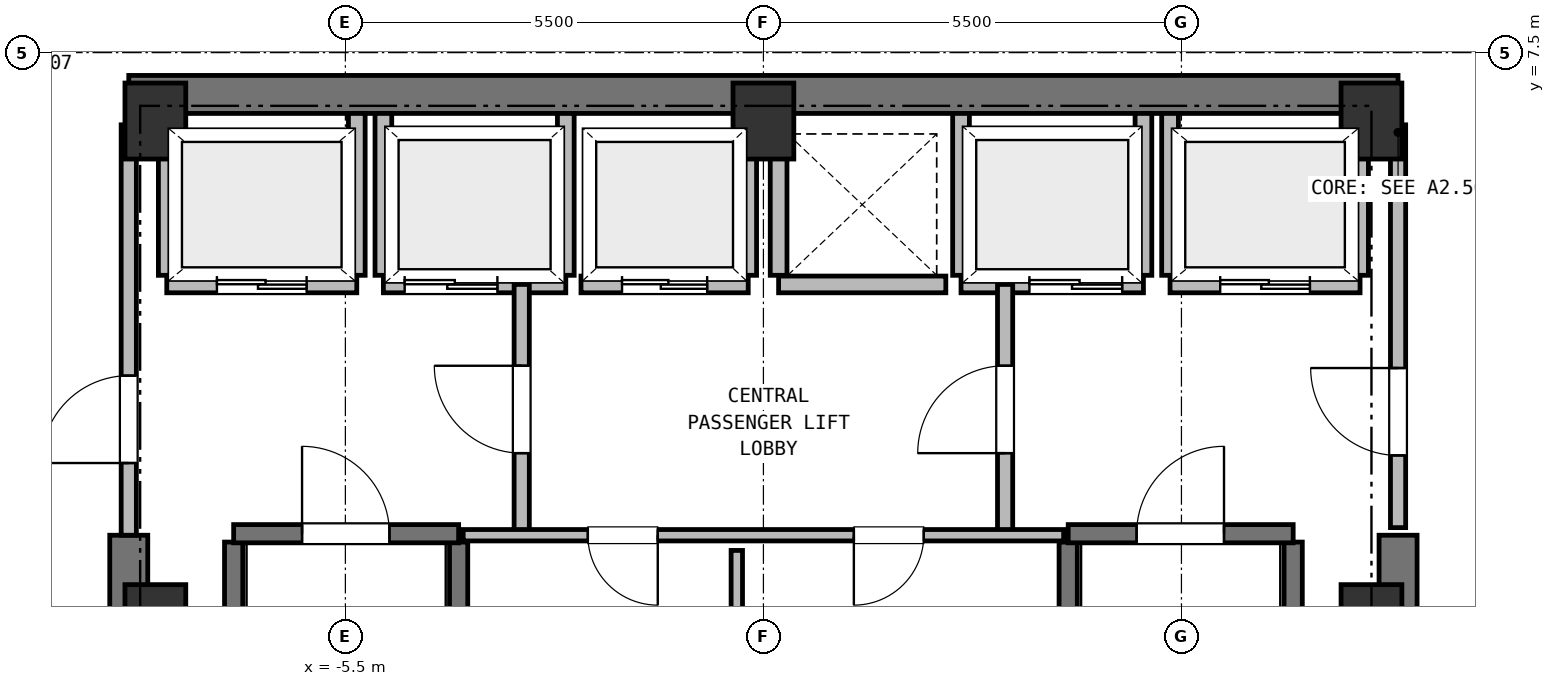
"""IFC4 building model, lengths in metres.
Left out: names, types, materials, properties, quantities, classifications, styles, units other than length and angle.
Written with IfcOpenShell. Run it as: python <this file> out.ifc"""

import sys

from ifc_helpers import new_model, si_unit, direction, frame, frame_2d, origin, origin_2d, place, context, subcontext, project, spatial, rectangle, extrude, element, fill, save


model = new_model("IFC4")
c1 = context("Model", 3, precision=1e-05, world=origin(), true_north=direction((0.0, 1.0)))
c2 = subcontext(c1, "Body", "Model", "MODEL_VIEW")
j1 = project(units=[si_unit("LENGTHUNIT", "METRE"), si_unit("PLANEANGLEUNIT", "RADIAN")], contexts=[c1])
p1 = place(None, origin())
s1 = spatial("IfcSite", under=j1, at=p1, CompositionType="ELEMENT")
p2 = place(p1, origin())
s2 = spatial("IfcBuilding", under=s1, at=p2, CompositionType="ELEMENT")
p3 = place(p2, frame((0.0, 0.0, 186.55)))
s3 = spatial("IfcBuildingStorey", under=s2, at=p3, CompositionType="ELEMENT", Elevation=186.55)
for number, where, z_axis, x_axis in (
    (1, (8.0, 0.0, 0.0), (0.0, 0.0, 1.0), (1.0, 0.0, 0.0)),
    (2, (8.0, 6.6, 0.0), (0.0, 0.0, 1.0), (1.0, 0.0, 0.0)),
    (3, (0.0, 6.6, 0.0), (0.0, 0.0, 1.0), (1.0, 0.0, 0.0)),
    (4, (-8.0, 6.6, 0.0), (0.0, 0.0, 1.0), (1.0, 0.0, 0.0)),
    (5, (-8.0, 0.0, 0.0), (0.0, 0.0, 1.0), (1.0, 0.0, 0.0)),
):
    element("IfcColumn", number, at=place(p3, frame(where, z_axis=z_axis, x_axis=x_axis)), inside=s3, PredefinedType="COLUMN", context=c2, shape_type="SweptSolid", body=[
        extrude(rectangle(XDim=0.8, YDim=1.0, at=origin_2d()), origin(), (0.0, 0.0, 1.0), 3.8),
    ])
p4 = place(p3, frame((-8.35, 6.95, 0.0), z_axis=(0.0, 0.0, 1.0), x_axis=(1.0, 0.0, 0.0)))
e6 = element("IfcWall", 6, at=p4, inside=s3, PredefinedType="SHEAR", context=c2, shape_type="SweptSolid", body=[
    extrude(rectangle(XDim=16.7, YDim=0.5, at=frame_2d((8.35, 0.0))), origin(), (0.0, 0.0, 1.0), 3.55),
])
for number, where, z_axis, x_axis in (
    (7, (-8.35, -6.95, 0.0), (0.0, 0.0, 1.0), (0.0, 1.0, 0.0)),
    (8, (8.35, -6.95, 0.0), (0.0, 0.0, 1.0), (0.0, 1.0, 0.0)),
):
    element("IfcWall", number, at=place(p3, frame(where, z_axis=z_axis, x_axis=x_axis)), inside=s3, PredefinedType="SHEAR", context=c2, shape_type="SweptSolid", body=[
        extrude(rectangle(XDim=8.1, YDim=0.5, at=frame_2d((4.05, 0.0))), origin(), (0.0, 0.0, 1.0), 3.55),
    ])
for number, where, z_axis, x_axis in (
    (9, (-6.97, -6.16, 0.0), (0.0, 0.0, 1.0), (0.0, 1.0, 0.0)),
    (10, (-4.01, -6.16, 0.0), (0.0, 0.0, 1.0), (0.0, 1.0, 0.0)),
):
    element("IfcWall", number, at=place(p3, frame(where, z_axis=z_axis, x_axis=x_axis)), inside=s3, PredefinedType="SHEAR", context=c2, shape_type="SweptSolid", body=[
        extrude(rectangle(XDim=7.22, YDim=0.24, at=frame_2d((3.61, 0.0))), origin(), (0.0, 0.0, 1.0), 3.55),
    ])
p5 = place(p3, frame((-6.97, 1.17, 0.0), z_axis=(0.0, 0.0, 1.0), x_axis=(1.0, 0.0, 0.0)))
e11 = element("IfcWall", 11, at=p5, inside=s3, PredefinedType="SHEAR", context=c2, shape_type="SweptSolid", body=[
    extrude(rectangle(XDim=2.96, YDim=0.24, at=frame_2d((1.48, 0.0))), origin(), (0.0, 0.0, 1.0), 3.55),
])
p6 = place(p5, frame((0.9, 0.0, 0.0)))
e12 = element("IfcOpeningElement", 12, at=p6, cuts=e11, PredefinedType="OPENING", context=c2, shape_type="SweptSolid", body=[
    extrude(rectangle(XDim=1.15, YDim=2.15, at=frame_2d((0.575, 1.075))), frame((0.0, 0.13, 0.0), z_axis=(0.0, -1.0, 0.0), x_axis=(1.0, 0.0, 0.0)), (0.0, 0.0, 1.0), 0.26),
])
for number, where, z_axis, x_axis in (
    (13, (4.01, -6.16, 0.0), (0.0, 0.0, 1.0), (0.0, 1.0, 0.0)),
    (14, (6.97, -6.16, 0.0), (0.0, 0.0, 1.0), (0.0, 1.0, 0.0)),
):
    element("IfcWall", number, at=place(p3, frame(where, z_axis=z_axis, x_axis=x_axis)), inside=s3, PredefinedType="SHEAR", context=c2, shape_type="SweptSolid", body=[
        extrude(rectangle(XDim=7.22, YDim=0.24, at=frame_2d((3.61, 0.0))), origin(), (0.0, 0.0, 1.0), 3.55),
    ])
p7 = place(p3, frame((4.01, 1.17, 0.0), z_axis=(0.0, 0.0, 1.0), x_axis=(1.0, 0.0, 0.0)))
e15 = element("IfcWall", 15, at=p7, inside=s3, PredefinedType="SHEAR", context=c2, shape_type="SweptSolid", body=[
    extrude(rectangle(XDim=2.96, YDim=0.24, at=frame_2d((1.48, 0.0))), origin(), (0.0, 0.0, 1.0), 3.55),
])
p8 = place(p7, frame((0.9, 0.0, 0.0)))
e16 = element("IfcOpeningElement", 16, at=p8, cuts=e15, PredefinedType="OPENING", context=c2, shape_type="SweptSolid", body=[
    extrude(rectangle(XDim=1.15, YDim=2.15, at=frame_2d((0.575, 1.075))), frame((0.0, 0.13, 0.0), z_axis=(0.0, -1.0, 0.0), x_axis=(1.0, 0.0, 0.0)), (0.0, 0.0, 1.0), 0.26),
])
p9 = place(p3, frame((-7.85, 4.45, 0.0), z_axis=(0.0, 0.0, 1.0), x_axis=(1.0, 0.0, 0.0)))
e17 = element("IfcWall", 17, at=p9, inside=s3, PredefinedType="PARTITIONING", context=c2, shape_type="SweptSolid", body=[
    extrude(rectangle(XDim=2.5, YDim=0.22, at=frame_2d((1.25, 0.0))), origin(), (0.0, 0.0, 1.0), 3.55),
])
p10 = place(p9, frame((0.66, 0.0, 0.0)))
e18 = element("IfcOpeningElement", 18, at=p10, cuts=e17, PredefinedType="OPENING", context=c2, shape_type="SweptSolid", body=[
    extrude(rectangle(XDim=1.18, YDim=2.15, at=frame_2d((0.59, 1.075))), frame((0.0, 0.12, 0.0), z_axis=(0.0, -1.0, 0.0), x_axis=(1.0, 0.0, 0.0)), (0.0, 0.0, 1.0), 0.24),
])
p11 = place(p3, frame((-7.85, 4.57, 0.0), z_axis=(0.0, 0.0, 1.0), x_axis=(0.0, 1.0, 0.0)))
e19 = element("IfcWall", 19, at=p11, inside=s3, PredefinedType="PARTITIONING", context=c2, shape_type="SweptSolid", body=[
    extrude(rectangle(XDim=2.13, YDim=0.22, at=frame_2d((1.065, 0.0))), origin(), (0.0, 0.0, 1.0), 3.18),
])
p12 = place(p3, frame((-5.35, 4.57, 0.0), z_axis=(0.0, 0.0, 1.0), x_axis=(0.0, 1.0, 0.0)))
e20 = element("IfcWall", 20, at=p12, inside=s3, PredefinedType="PARTITIONING", context=c2, shape_type="SweptSolid", body=[
    extrude(rectangle(XDim=2.13, YDim=0.22, at=frame_2d((1.065, 0.0))), origin(), (0.0, 0.0, 1.0), 3.55),
])
p13 = place(p3, frame((5.35, 4.45, 0.0), z_axis=(0.0, 0.0, 1.0), x_axis=(1.0, 0.0, 0.0)))
e21 = element("IfcWall", 21, at=p13, inside=s3, PredefinedType="PARTITIONING", context=c2, shape_type="SweptSolid", body=[
    extrude(rectangle(XDim=2.5, YDim=0.22, at=frame_2d((1.25, 0.0))), origin(), (0.0, 0.0, 1.0), 3.55),
])
p14 = place(p13, frame((0.66, 0.0, 0.0)))
e22 = element("IfcOpeningElement", 22, at=p14, cuts=e21, PredefinedType="OPENING", context=c2, shape_type="SweptSolid", body=[
    extrude(rectangle(XDim=1.18, YDim=2.15, at=frame_2d((0.59, 1.075))), frame((0.0, 0.12, 0.0), z_axis=(0.0, -1.0, 0.0), x_axis=(1.0, 0.0, 0.0)), (0.0, 0.0, 1.0), 0.24),
])
p15 = place(p3, frame((5.35, 4.57, 0.0), z_axis=(0.0, 0.0, 1.0), x_axis=(0.0, 1.0, 0.0)))
e23 = element("IfcWall", 23, at=p15, inside=s3, PredefinedType="PARTITIONING", context=c2, shape_type="SweptSolid", body=[
    extrude(rectangle(XDim=2.13, YDim=0.22, at=frame_2d((1.065, 0.0))), origin(), (0.0, 0.0, 1.0), 3.55),
])
p16 = place(p3, frame((7.85, 4.57, 0.0), z_axis=(0.0, 0.0, 1.0), x_axis=(0.0, 1.0, 0.0)))
e24 = element("IfcWall", 24, at=p16, inside=s3, PredefinedType="PARTITIONING", context=c2, shape_type="SweptSolid", body=[
    extrude(rectangle(XDim=2.13, YDim=0.22, at=frame_2d((1.065, 0.0))), origin(), (0.0, 0.0, 1.0), 3.18),
])
p17 = place(p3, frame((-5.0, 4.45, 0.0), z_axis=(0.0, 0.0, 1.0), x_axis=(1.0, 0.0, 0.0)))
e25 = element("IfcWall", 25, at=p17, inside=s3, PredefinedType="PARTITIONING", context=c2, shape_type="SweptSolid", body=[
    extrude(rectangle(XDim=2.4, YDim=0.22, at=frame_2d((1.2, 0.0))), origin(), (0.0, 0.0, 1.0), 3.55),
])
p18 = place(p17, frame((0.28, 0.0, 0.0)))
e26 = element("IfcOpeningElement", 26, at=p18, cuts=e25, PredefinedType="OPENING", context=c2, shape_type="SweptSolid", body=[
    extrude(rectangle(XDim=1.22, YDim=2.15, at=frame_2d((0.61, 1.075))), frame((0.0, 0.12, 0.0), z_axis=(0.0, -1.0, 0.0), x_axis=(1.0, 0.0, 0.0)), (0.0, 0.0, 1.0), 0.24),
])
for number, where, z_axis, x_axis in (
    (27, (-5.0, 4.57, 0.0), (0.0, 0.0, 1.0), (0.0, 1.0, 0.0)),
    (28, (-2.6, 4.57, 0.0), (0.0, 0.0, 1.0), (0.0, 1.0, 0.0)),
):
    element("IfcWall", number, at=place(p3, frame(where, z_axis=z_axis, x_axis=x_axis)), inside=s3, PredefinedType="PARTITIONING", context=c2, shape_type="SweptSolid", body=[
        extrude(rectangle(XDim=2.13, YDim=0.22, at=frame_2d((1.065, 0.0))), origin(), (0.0, 0.0, 1.0), 3.55),
    ])
p19 = place(p3, frame((2.6, 4.45, 0.0), z_axis=(0.0, 0.0, 1.0), x_axis=(1.0, 0.0, 0.0)))
e29 = element("IfcWall", 29, at=p19, inside=s3, PredefinedType="PARTITIONING", context=c2, shape_type="SweptSolid", body=[
    extrude(rectangle(XDim=2.4, YDim=0.22, at=frame_2d((1.2, 0.0))), origin(), (0.0, 0.0, 1.0), 3.55),
])
p20 = place(p19, frame((0.9, 0.0, 0.0)))
e30 = element("IfcOpeningElement", 30, at=p20, cuts=e29, PredefinedType="OPENING", context=c2, shape_type="SweptSolid", body=[
    extrude(rectangle(XDim=1.22, YDim=2.15, at=frame_2d((0.61, 1.075))), frame((0.0, 0.12, 0.0), z_axis=(0.0, -1.0, 0.0), x_axis=(1.0, 0.0, 0.0)), (0.0, 0.0, 1.0), 0.24),
])
for number, where, z_axis, x_axis in (
    (31, (2.6, 4.57, 0.0), (0.0, 0.0, 1.0), (0.0, 1.0, 0.0)),
    (32, (5.0, 4.57, 0.0), (0.0, 0.0, 1.0), (0.0, 1.0, 0.0)),
):
    element("IfcWall", number, at=place(p3, frame(where, z_axis=z_axis, x_axis=x_axis)), inside=s3, PredefinedType="PARTITIONING", context=c2, shape_type="SweptSolid", body=[
        extrude(rectangle(XDim=2.13, YDim=0.22, at=frame_2d((1.065, 0.0))), origin(), (0.0, 0.0, 1.0), 3.55),
    ])
p21 = place(p3, frame((-2.4, 4.45, 0.0), z_axis=(0.0, 0.0, 1.0), x_axis=(1.0, 0.0, 0.0)))
e33 = element("IfcWall", 33, at=p21, inside=s3, PredefinedType="PARTITIONING", context=c2, shape_type="SweptSolid", body=[
    extrude(rectangle(XDim=2.2, YDim=0.22, at=frame_2d((1.1, 0.0))), origin(), (0.0, 0.0, 1.0), 3.55),
])
p22 = place(p21, frame((0.54, 0.0, 0.0)))
e34 = element("IfcOpeningElement", 34, at=p22, cuts=e33, PredefinedType="OPENING", context=c2, shape_type="SweptSolid", body=[
    extrude(rectangle(XDim=1.12, YDim=2.15, at=frame_2d((0.56, 1.075))), frame((0.0, 0.12, 0.0), z_axis=(0.0, -1.0, 0.0), x_axis=(1.0, 0.0, 0.0)), (0.0, 0.0, 1.0), 0.24),
])
p23 = place(p3, frame((-0.2, 4.57, 0.0), z_axis=(0.0, 0.0, 1.0), x_axis=(0.0, 1.0, 0.0)))
e35 = element("IfcWall", 35, at=p23, inside=s3, PredefinedType="PARTITIONING", context=c2, shape_type="SweptSolid", body=[
    extrude(rectangle(XDim=2.13, YDim=0.22, at=frame_2d((1.065, 0.0))), origin(), (0.0, 0.0, 1.0), 3.55),
])
p24 = place(p3, frame((0.2, 4.45, 0.0), z_axis=(0.0, 0.0, 1.0), x_axis=(1.0, 0.0, 0.0)))
e36 = element("IfcWall", 36, at=p24, inside=s3, PredefinedType="PARTITIONING", context=c2, shape_type="SweptSolid", body=[
    extrude(rectangle(XDim=2.2, YDim=0.22, at=frame_2d((1.1, 0.0))), origin(), (0.0, 0.0, 1.0), 3.55),
])
p25 = place(p3, frame((0.2, 4.57, 0.0), z_axis=(0.0, 0.0, 1.0), x_axis=(0.0, 1.0, 0.0)))
e37 = element("IfcWall", 37, at=p25, inside=s3, PredefinedType="PARTITIONING", context=c2, shape_type="SweptSolid", body=[
    extrude(rectangle(XDim=2.13, YDim=0.22, at=frame_2d((1.065, 0.0))), origin(), (0.0, 0.0, 1.0), 3.55),
])
p26 = place(p3, frame((-3.18, 1.15, 0.0), z_axis=(0.0, 0.0, 1.0), x_axis=(0.0, 1.0, 0.0)))
e38 = element("IfcWall", 38, at=p26, inside=s3, PredefinedType="PARTITIONING", context=c2, shape_type="SweptSolid", body=[
    extrude(rectangle(XDim=3.3, YDim=0.2, at=frame_2d((1.65, 0.0))), origin(), (0.0, 0.0, 1.0), 3.55),
])
p27 = place(p26, frame((1.08, 0.0, 0.0)))
e39 = element("IfcOpeningElement", 39, at=p27, cuts=e38, PredefinedType="OPENING", context=c2, shape_type="SweptSolid", body=[
    extrude(rectangle(XDim=1.15, YDim=2.15, at=frame_2d((0.575, 1.075))), frame((0.0, 0.11, 0.0), z_axis=(0.0, -1.0, 0.0), x_axis=(1.0, 0.0, 0.0)), (0.0, 0.0, 1.0), 0.22),
])
p28 = place(p3, frame((3.18, 1.15, 0.0), z_axis=(0.0, 0.0, 1.0), x_axis=(0.0, 1.0, 0.0)))
e40 = element("IfcWall", 40, at=p28, inside=s3, PredefinedType="PARTITIONING", context=c2, shape_type="SweptSolid", body=[
    extrude(rectangle(XDim=3.3, YDim=0.2, at=frame_2d((1.65, 0.0))), origin(), (0.0, 0.0, 1.0), 3.55),
])
p29 = place(p28, frame((1.08, 0.0, 0.0)))
e41 = element("IfcOpeningElement", 41, at=p29, cuts=e40, PredefinedType="OPENING", context=c2, shape_type="SweptSolid", body=[
    extrude(rectangle(XDim=1.15, YDim=2.15, at=frame_2d((0.575, 1.075))), frame((0.0, 0.11, 0.0), z_axis=(0.0, -1.0, 0.0), x_axis=(1.0, 0.0, 0.0)), (0.0, 0.0, 1.0), 0.22),
])
p30 = place(p3, frame((-8.35, 1.15, 0.0), z_axis=(0.0, 0.0, 1.0), x_axis=(0.0, 1.0, 0.0)))
e42 = element("IfcWall", 42, at=p30, inside=s3, PredefinedType="PARTITIONING", context=c2, shape_type="SweptSolid", body=[
    extrude(rectangle(XDim=5.4, YDim=0.2, at=frame_2d((2.7, 0.0))), origin(), (0.0, 0.0, 1.0), 3.55),
])
p31 = place(p30, frame((0.95, 0.0, 0.0)))
e43 = element("IfcOpeningElement", 43, at=p31, cuts=e42, PredefinedType="OPENING", context=c2, shape_type="SweptSolid", body=[
    extrude(rectangle(XDim=1.15, YDim=2.15, at=frame_2d((0.575, 1.075))), frame((0.0, 0.11, 0.0), z_axis=(0.0, -1.0, 0.0), x_axis=(1.0, 0.0, 0.0)), (0.0, 0.0, 1.0), 0.22),
])
p32 = place(p3, frame((8.35, 1.25, 0.0), z_axis=(0.0, 0.0, 1.0), x_axis=(0.0, 1.0, 0.0)))
e44 = element("IfcWall", 44, at=p32, inside=s3, PredefinedType="PARTITIONING", context=c2, shape_type="SweptSolid", body=[
    extrude(rectangle(XDim=5.3, YDim=0.2, at=frame_2d((2.65, 0.0))), origin(), (0.0, 0.0, 1.0), 3.55),
])
p33 = place(p32, frame((0.95, 0.0, 0.0)))
e45 = element("IfcOpeningElement", 45, at=p33, cuts=e44, PredefinedType="OPENING", context=c2, shape_type="SweptSolid", body=[
    extrude(rectangle(XDim=1.15, YDim=2.15, at=frame_2d((0.575, 1.075))), frame((0.0, 0.11, 0.0), z_axis=(0.0, -1.0, 0.0), x_axis=(1.0, 0.0, 0.0)), (0.0, 0.0, 1.0), 0.22),
])
p34 = place(p3, frame((3.95, 1.15, 0.0), z_axis=(0.0, 0.0, 1.0), x_axis=(-1.0, 0.0, 0.0)))
e46 = element("IfcWall", 46, at=p34, inside=s3, PredefinedType="PARTITIONING", context=c2, shape_type="SweptSolid", body=[
    extrude(rectangle(XDim=7.9, YDim=0.15, at=frame_2d((3.95, 0.0))), origin(), (0.0, 0.0, 1.0), 3.55),
])
p35 = place(p34, frame((5.34, 0.0, 0.0)))
e47 = element("IfcOpeningElement", 47, at=p35, cuts=e46, PredefinedType="OPENING", context=c2, shape_type="SweptSolid", body=[
    extrude(rectangle(XDim=0.92, YDim=2.05, at=frame_2d((0.46, 1.025))), frame((0.0, 0.085, 0.0), z_axis=(0.0, -1.0, 0.0), x_axis=(1.0, 0.0, 0.0)), (0.0, 0.0, 1.0), 0.17),
])
p36 = place(p34, frame((1.84, 0.0, 0.0)))
e48 = element("IfcOpeningElement", 48, at=p36, cuts=e46, PredefinedType="OPENING", context=c2, shape_type="SweptSolid", body=[
    extrude(rectangle(XDim=0.92, YDim=2.05, at=frame_2d((0.46, 1.025))), frame((0.0, 0.085, 0.0), z_axis=(0.0, -1.0, 0.0), x_axis=(1.0, 0.0, 0.0)), (0.0, 0.0, 1.0), 0.17),
])
p37 = place(p3, frame((-0.35, -1.73, 0.0), z_axis=(0.0, 0.0, 1.0), x_axis=(0.0, 1.0, 0.0)))
e49 = element("IfcWall", 49, at=p37, inside=s3, PredefinedType="PARTITIONING", context=c2, shape_type="SweptSolid", body=[
    extrude(rectangle(XDim=2.68, YDim=0.15, at=frame_2d((1.34, 0.0))), origin(), (0.0, 0.0, 1.0), 3.55),
])
p38 = place(p3, frame((8.648, 9.171, 0.0), z_axis=(0.0, 0.0, 1.0), x_axis=(0.689960858356, -0.723846678473, 0.0)))
e50 = element("IfcWall", 50, at=p38, inside=s3, PredefinedType="PARTITIONING", context=c2, shape_type="SweptSolid", body=[
    extrude(rectangle(XDim=2.572, YDim=0.15, at=frame_2d((1.286, 0.0))), origin(), (0.0, 0.0, 1.0), 3.55),
])
p39 = place(p3, frame((-10.422, 7.309, 0.0), z_axis=(0.0, 0.0, 1.0), x_axis=(0.689960858356, 0.723846678473, 0.0)))
e51 = element("IfcWall", 51, at=p39, inside=s3, PredefinedType="PARTITIONING", context=c2, shape_type="SweptSolid", body=[
    extrude(rectangle(XDim=2.572, YDim=0.15, at=frame_2d((1.286, 0.0))), origin(), (0.0, 0.0, 1.0), 3.55),
])
p40 = place(p39, frame((0.796, 0.0, 0.0)))
e52 = element("IfcOpeningElement", 52, at=p40, cuts=e51, PredefinedType="OPENING", context=c2, shape_type="SweptSolid", body=[
    extrude(rectangle(XDim=1.06, YDim=2.15, at=frame_2d((0.53, 1.075))), frame((0.0, 0.085, 0.0), z_axis=(0.0, -1.0, 0.0), x_axis=(1.0, 0.0, 0.0)), (0.0, 0.0, 1.0), 0.17),
])
p41 = place(p6, origin())
e53 = element("IfcDoor", 53, at=p41, inside=s3, OperationType="SINGLE_SWING_LEFT", PredefinedType="DOOR", context=c2, shape_type="SweptSolid", body=[
    extrude(rectangle(XDim=1.15, YDim=2.15, at=frame_2d((0.575, 1.075))), frame((0.0, 0.025, 0.0), z_axis=(0.0, -1.0, 0.0), x_axis=(1.0, 0.0, 0.0)), (0.0, 0.0, 1.0), 0.05),
])
fill(e12, e53)
p42 = place(p8, origin())
e54 = element("IfcDoor", 54, at=p42, inside=s3, OperationType="SINGLE_SWING_RIGHT", PredefinedType="DOOR", context=c2, shape_type="SweptSolid", body=[
    extrude(rectangle(XDim=1.15, YDim=2.15, at=frame_2d((0.575, 1.075))), frame((0.0, 0.025, 0.0), z_axis=(0.0, -1.0, 0.0), x_axis=(1.0, 0.0, 0.0)), (0.0, 0.0, 1.0), 0.05),
])
fill(e16, e54)
p43 = place(p10, origin())
e55 = element("IfcDoor", 55, at=p43, inside=s3, OperationType="DOUBLE_DOOR_SLIDING", PredefinedType="DOOR", context=c2, shape_type="SweptSolid", body=[
    extrude(rectangle(XDim=1.18, YDim=2.15, at=frame_2d((0.59, 1.075))), frame((0.0, 0.025, 0.0), z_axis=(0.0, -1.0, 0.0), x_axis=(1.0, 0.0, 0.0)), (0.0, 0.0, 1.0), 0.05),
])
fill(e18, e55)
p44 = place(p14, origin())
e56 = element("IfcDoor", 56, at=p44, inside=s3, OperationType="DOUBLE_DOOR_SLIDING", PredefinedType="DOOR", context=c2, shape_type="SweptSolid", body=[
    extrude(rectangle(XDim=1.18, YDim=2.15, at=frame_2d((0.59, 1.075))), frame((0.0, 0.025, 0.0), z_axis=(0.0, -1.0, 0.0), x_axis=(1.0, 0.0, 0.0)), (0.0, 0.0, 1.0), 0.05),
])
fill(e22, e56)
p45 = place(p18, origin())
e57 = element("IfcDoor", 57, at=p45, inside=s3, OperationType="DOUBLE_DOOR_SLIDING", PredefinedType="DOOR", context=c2, shape_type="SweptSolid", body=[
    extrude(rectangle(XDim=1.22, YDim=2.15, at=frame_2d((0.61, 1.075))), frame((0.0, 0.025, 0.0), z_axis=(0.0, -1.0, 0.0), x_axis=(1.0, 0.0, 0.0)), (0.0, 0.0, 1.0), 0.05),
])
fill(e26, e57)
p46 = place(p20, origin())
e58 = element("IfcDoor", 58, at=p46, inside=s3, OperationType="DOUBLE_DOOR_SLIDING", PredefinedType="DOOR", context=c2, shape_type="SweptSolid", body=[
    extrude(rectangle(XDim=1.22, YDim=2.15, at=frame_2d((0.61, 1.075))), frame((0.0, 0.025, 0.0), z_axis=(0.0, -1.0, 0.0), x_axis=(1.0, 0.0, 0.0)), (0.0, 0.0, 1.0), 0.05),
])
fill(e30, e58)
p47 = place(p22, origin())
e59 = element("IfcDoor", 59, at=p47, inside=s3, OperationType="DOUBLE_DOOR_SLIDING", PredefinedType="DOOR", context=c2, shape_type="SweptSolid", body=[
    extrude(rectangle(XDim=1.12, YDim=2.15, at=frame_2d((0.56, 1.075))), frame((0.0, 0.025, 0.0), z_axis=(0.0, -1.0, 0.0), x_axis=(1.0, 0.0, 0.0)), (0.0, 0.0, 1.0), 0.05),
])
fill(e34, e59)
p48 = place(p27, origin())
e60 = element("IfcDoor", 60, at=p48, inside=s3, OperationType="SINGLE_SWING_RIGHT", PredefinedType="DOOR", context=c2, shape_type="SweptSolid", body=[
    extrude(rectangle(XDim=1.15, YDim=2.15, at=frame_2d((0.575, 1.075))), frame((0.0, 0.025, 0.0), z_axis=(0.0, -1.0, 0.0), x_axis=(1.0, 0.0, 0.0)), (0.0, 0.0, 1.0), 0.05),
])
fill(e39, e60)
p49 = place(p29, origin())
e61 = element("IfcDoor", 61, at=p49, inside=s3, OperationType="SINGLE_SWING_LEFT", PredefinedType="DOOR", context=c2, shape_type="SweptSolid", body=[
    extrude(rectangle(XDim=1.15, YDim=2.15, at=frame_2d((0.575, 1.075))), frame((0.0, 0.025, 0.0), z_axis=(0.0, -1.0, 0.0), x_axis=(1.0, 0.0, 0.0)), (0.0, 0.0, 1.0), 0.05),
])
fill(e41, e61)
p50 = place(p31, origin())
e62 = element("IfcDoor", 62, at=p50, inside=s3, OperationType="SINGLE_SWING_LEFT", PredefinedType="DOOR", context=c2, shape_type="SweptSolid", body=[
    extrude(rectangle(XDim=1.15, YDim=2.15, at=frame_2d((0.575, 1.075))), frame((0.0, 0.025, 0.0), z_axis=(0.0, -1.0, 0.0), x_axis=(1.0, 0.0, 0.0)), (0.0, 0.0, 1.0), 0.05),
])
fill(e43, e62)
p51 = place(p33, origin())
e63 = element("IfcDoor", 63, at=p51, inside=s3, OperationType="SINGLE_SWING_RIGHT", PredefinedType="DOOR", context=c2, shape_type="SweptSolid", body=[
    extrude(rectangle(XDim=1.15, YDim=2.15, at=frame_2d((0.575, 1.075))), frame((0.0, 0.025, 0.0), z_axis=(0.0, -1.0, 0.0), x_axis=(1.0, 0.0, 0.0)), (0.0, 0.0, 1.0), 0.05),
])
fill(e45, e63)
p52 = place(p35, origin())
e64 = element("IfcDoor", 64, at=p52, inside=s3, OperationType="SINGLE_SWING_LEFT", PredefinedType="DOOR", context=c2, shape_type="SweptSolid", body=[
    extrude(rectangle(XDim=0.92, YDim=2.05, at=frame_2d((0.46, 1.025))), frame((0.0, 0.025, 0.0), z_axis=(0.0, -1.0, 0.0), x_axis=(1.0, 0.0, 0.0)), (0.0, 0.0, 1.0), 0.05),
])
fill(e47, e64)
p53 = place(p36, origin())
e65 = element("IfcDoor", 65, at=p53, inside=s3, OperationType="SINGLE_SWING_RIGHT", PredefinedType="DOOR", context=c2, shape_type="SweptSolid", body=[
    extrude(rectangle(XDim=0.92, YDim=2.05, at=frame_2d((0.46, 1.025))), frame((0.0, 0.025, 0.0), z_axis=(0.0, -1.0, 0.0), x_axis=(1.0, 0.0, 0.0)), (0.0, 0.0, 1.0), 0.05),
])
fill(e48, e65)
save(model, sys.argv[1])
